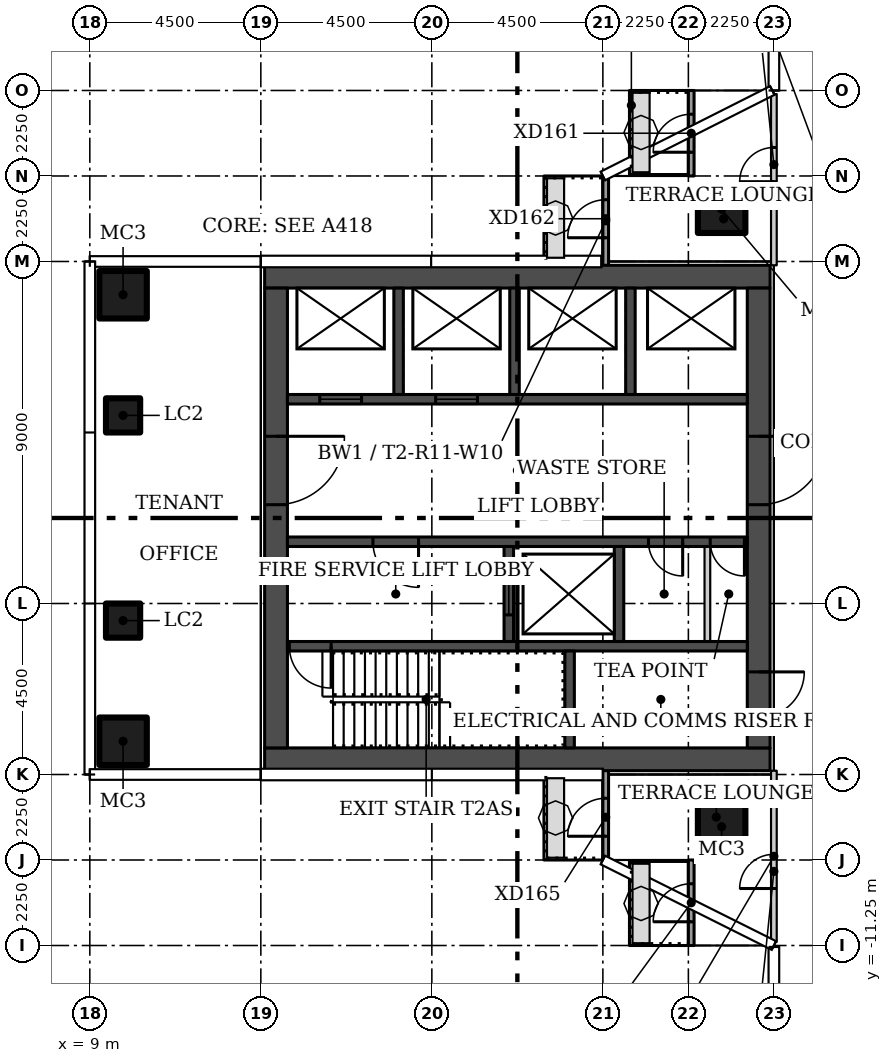
"""IFC4 building model, lengths in metres.
Left out: names, types, materials, properties, quantities, classifications, styles, units other than length and angle.
Written with IfcOpenShell. Run it as: python <this file> out.ifc"""

import sys

from ifc_helpers import new_model, si_unit, direction, frame, frame_2d, origin, origin_2d, place, context, subcontext, project, spatial, rectangle, hollow_rectangle, extrude, element, fill, save


model = new_model("IFC4")
c1 = context("Model", 3, precision=1e-05, world=origin(), true_north=direction((0.0, 1.0)))
c2 = subcontext(c1, "Body", "Model", "MODEL_VIEW")
j1 = project(units=[si_unit("LENGTHUNIT", "METRE"), si_unit("PLANEANGLEUNIT", "RADIAN")], contexts=[c1])
p1 = place(None, origin())
s1 = spatial("IfcSite", under=j1, at=p1, CompositionType="ELEMENT")
p2 = place(p1, origin())
s2 = spatial("IfcBuilding", under=s1, at=p2, CompositionType="ELEMENT")
p3 = place(p2, frame((0.0, 0.0, 109.2)))
s3 = spatial("IfcBuildingStorey", under=s2, at=p3, CompositionType="ELEMENT", Elevation=109.2)
for number, where in (
    (1, (25.625, 8.125, 0.0)),
    (2, (25.625, -8.125, 0.0)),
    (3, (9.875, -5.875, 0.0)),
    (4, (9.875, 5.875, 0.0)),
):
    element("IfcColumn", number, at=place(p3, frame(where)), inside=s3, PredefinedType="COLUMN", context=c2, shape_type="SweptSolid", body=[
        extrude(hollow_rectangle(XDim=1.25, YDim=1.25, WallThickness=0.05, at=origin_2d()), origin(), (0.0, 0.0, 1.0), 3.55),
    ])
for number, where in (
    (5, (9.875, -2.7, 0.0)),
    (6, (9.875, 2.7, 0.0)),
):
    element("IfcColumn", number, at=place(p3, frame(where)), inside=s3, PredefinedType="COLUMN", context=c2, shape_type="SweptSolid", body=[
        extrude(hollow_rectangle(XDim=0.9, YDim=0.9, WallThickness=0.036, at=origin_2d()), origin(), (0.0, 0.0, 1.0), 3.55),
    ])
p4 = place(p3, frame((27.0, 6.65, 0.0), z_axis=(0.0, 0.0, 1.0), x_axis=(0.0, 1.0, 0.0)))
e7 = element("IfcWall", 7, at=p4, inside=s3, PredefinedType="PARTITIONING", context=c2, shape_type="SweptSolid", body=[
    extrude(rectangle(XDim=4.505, YDim=0.15, at=frame_2d((2.252, 0.0))), origin(), (0.0, 0.0, 1.0), 3.55),
])
p5 = place(p4, frame((2.2, 0.0, 0.0)))
e8 = element("IfcOpeningElement", 8, at=p5, cuts=e7, PredefinedType="OPENING", context=c2, shape_type="SweptSolid", body=[
    extrude(rectangle(XDim=0.9, YDim=2.1, at=frame_2d((0.45, 1.05))), frame((0.0, 0.085, 0.0), z_axis=(0.0, -1.0, 0.0), x_axis=(1.0, 0.0, 0.0)), (0.0, 0.0, 1.0), 0.17),
])
p6 = place(p3, frame((27.0, -11.155, 0.0), z_axis=(0.0, 0.0, 1.0), x_axis=(0.0, 1.0, 0.0)))
e9 = element("IfcWall", 9, at=p6, inside=s3, PredefinedType="PARTITIONING", context=c2, shape_type="SweptSolid", body=[
    extrude(rectangle(XDim=4.505, YDim=0.15, at=frame_2d((2.252, 0.0))), origin(), (0.0, 0.0, 1.0), 3.55),
])
p7 = place(p6, frame((1.405, 0.0, 0.0)))
e10 = element("IfcOpeningElement", 10, at=p7, cuts=e9, PredefinedType="OPENING", context=c2, shape_type="SweptSolid", body=[
    extrude(rectangle(XDim=0.9, YDim=2.1, at=frame_2d((0.45, 1.05))), frame((0.0, 0.085, 0.0), z_axis=(0.0, -1.0, 0.0), x_axis=(1.0, 0.0, 0.0)), (0.0, 0.0, 1.0), 0.17),
])
p8 = place(p3, frame((24.825, 9.0, 0.0), z_axis=(0.0, 0.0, 1.0), x_axis=(0.0, 1.0, 0.0)))
e11 = element("IfcWall", 11, at=p8, inside=s3, PredefinedType="SOLIDWALL", context=c2, shape_type="SweptSolid", body=[
    extrude(rectangle(XDim=2.25, YDim=0.15, at=frame_2d((1.125, 0.0))), origin(), (0.0, 0.0, 1.0), 3.45),
])
p9 = place(p8, frame((0.625, 0.0, 0.0)))
e12 = element("IfcOpeningElement", 12, at=p9, cuts=e11, PredefinedType="OPENING", context=c2, shape_type="SweptSolid", body=[
    extrude(rectangle(XDim=1.0, YDim=2.4, at=frame_2d((0.5, 1.2))), frame((0.0, 0.085, 0.0), z_axis=(0.0, -1.0, 0.0), x_axis=(1.0, 0.0, 0.0)), (0.0, 0.0, 1.0), 0.17),
])
p10 = place(p3, frame((22.575, 6.643, 0.0), z_axis=(0.0, 0.0, 1.0), x_axis=(0.0, 1.0, 0.0)))
e13 = element("IfcWall", 13, at=p10, inside=s3, PredefinedType="SOLIDWALL", context=c2, shape_type="SweptSolid", body=[
    extrude(rectangle(XDim=2.357, YDim=0.15, at=frame_2d((1.178, 0.0))), origin(), (0.0, 0.0, 1.0), 3.45),
])
p11 = place(p10, frame((0.732, 0.0, 0.0)))
e14 = element("IfcOpeningElement", 14, at=p11, cuts=e13, PredefinedType="OPENING", context=c2, shape_type="SweptSolid", body=[
    extrude(rectangle(XDim=1.0, YDim=2.4, at=frame_2d((0.5, 1.2))), frame((0.0, 0.085, 0.0), z_axis=(0.0, -1.0, 0.0), x_axis=(1.0, 0.0, 0.0)), (0.0, 0.0, 1.0), 0.17),
])
p12 = place(p3, frame((22.575, -9.0, 0.0), z_axis=(0.0, 0.0, 1.0), x_axis=(0.0, 1.0, 0.0)))
e15 = element("IfcWall", 15, at=p12, inside=s3, PredefinedType="SOLIDWALL", context=c2, shape_type="SweptSolid", body=[
    extrude(rectangle(XDim=2.357, YDim=0.15, at=frame_2d((1.178, 0.0))), origin(), (0.0, 0.0, 1.0), 3.45),
])
p13 = place(p12, frame((0.625, 0.0, 0.0)))
e16 = element("IfcOpeningElement", 16, at=p13, cuts=e15, PredefinedType="OPENING", context=c2, shape_type="SweptSolid", body=[
    extrude(rectangle(XDim=1.0, YDim=2.4, at=frame_2d((0.5, 1.2))), frame((0.0, 0.085, 0.0), z_axis=(0.0, -1.0, 0.0), x_axis=(1.0, 0.0, 0.0)), (0.0, 0.0, 1.0), 0.17),
])
p14 = place(p3, frame((24.825, -11.25, 0.0), z_axis=(0.0, 0.0, 1.0), x_axis=(0.0, 1.0, 0.0)))
e17 = element("IfcWall", 17, at=p14, inside=s3, PredefinedType="SOLIDWALL", context=c2, shape_type="SweptSolid", body=[
    extrude(rectangle(XDim=2.25, YDim=0.15, at=frame_2d((1.125, 0.0))), origin(), (0.0, 0.0, 1.0), 3.45),
])
p15 = place(p14, frame((0.625, 0.0, 0.0)))
e18 = element("IfcOpeningElement", 18, at=p15, cuts=e17, PredefinedType="OPENING", context=c2, shape_type="SweptSolid", body=[
    extrude(rectangle(XDim=1.0, YDim=2.4, at=frame_2d((0.5, 1.2))), frame((0.0, 0.085, 0.0), z_axis=(0.0, -1.0, 0.0), x_axis=(1.0, 0.0, 0.0)), (0.0, 0.0, 1.0), 0.17),
])
for number, where in (
    (19, (13.6, -6.35, 0.0)),
    (20, (13.6, 6.35, 0.0)),
):
    element("IfcWall", number, at=place(p3, frame(where)), inside=s3, PredefinedType="SHEAR", context=c2, shape_type="SweptSolid", body=[
        extrude(rectangle(XDim=13.3, YDim=0.6, at=frame_2d((6.65, 0.0))), origin(), (0.0, 0.0, 1.0), 3.55),
    ])
p16 = place(p3, frame((13.9, 6.05, 0.0), z_axis=(0.0, 0.0, 1.0), x_axis=(0.0, -1.0, 0.0)))
e21 = element("IfcWall", 21, at=p16, inside=s3, PredefinedType="SHEAR", context=c2, shape_type="SweptSolid", body=[
    extrude(rectangle(XDim=12.1, YDim=0.6, at=frame_2d((6.05, 0.0))), origin(), (0.0, 0.0, 1.0), 3.55),
])
p17 = place(p16, frame((3.9, 0.0, 0.0)))
e22 = element("IfcOpeningElement", 22, at=p17, cuts=e21, PredefinedType="OPENING", context=c2, shape_type="SweptSolid", body=[
    extrude(rectangle(XDim=1.8, YDim=2.4, at=frame_2d((0.9, 1.2))), frame((0.0, 0.31, 0.0), z_axis=(0.0, -1.0, 0.0), x_axis=(1.0, 0.0, 0.0)), (0.0, 0.0, 1.0), 0.62),
])
p18 = place(p3, frame((26.6, 6.05, 0.0), z_axis=(0.0, 0.0, 1.0), x_axis=(0.0, -1.0, 0.0)))
e23 = element("IfcWall", 23, at=p18, inside=s3, PredefinedType="SHEAR", context=c2, shape_type="SweptSolid", body=[
    extrude(rectangle(XDim=12.1, YDim=0.6, at=frame_2d((6.05, 0.0))), origin(), (0.0, 0.0, 1.0), 3.55),
])
p19 = place(p18, frame((10.1, 0.0, 0.0)))
e24 = element("IfcOpeningElement", 24, at=p19, cuts=e23, PredefinedType="OPENING", context=c2, shape_type="SweptSolid", body=[
    extrude(rectangle(XDim=1.2, YDim=2.1, at=frame_2d((0.6, 1.05))), frame((0.0, 0.31, 0.0), z_axis=(0.0, -1.0, 0.0), x_axis=(1.0, 0.0, 0.0)), (0.0, 0.0, 1.0), 0.62),
])
p20 = place(p18, frame((3.9, 0.0, 0.0)))
e25 = element("IfcOpeningElement", 25, at=p20, cuts=e23, PredefinedType="OPENING", context=c2, shape_type="SweptSolid", body=[
    extrude(rectangle(XDim=1.8, YDim=2.4, at=frame_2d((0.9, 1.2))), frame((0.0, 0.31, 0.0), z_axis=(0.0, -1.0, 0.0), x_axis=(1.0, 0.0, 0.0)), (0.0, 0.0, 1.0), 0.62),
])
p21 = place(p3, frame((26.3, -3.375, 0.0), z_axis=(0.0, 0.0, 1.0), x_axis=(-1.0, 0.0, 0.0)))
e26 = element("IfcWall", 26, at=p21, inside=s3, PredefinedType="SHEAR", context=c2, shape_type="SweptSolid", body=[
    extrude(rectangle(XDim=12.1, YDim=0.25, at=frame_2d((6.05, 0.0))), origin(), (0.0, 0.0, 1.0), 3.55),
])
p22 = place(p21, frame((10.95, 0.0, 0.0)))
e27 = element("IfcOpeningElement", 27, at=p22, cuts=e26, PredefinedType="OPENING", context=c2, shape_type="SweptSolid", body=[
    extrude(rectangle(XDim=1.1, YDim=2.1, at=frame_2d((0.55, 1.05))), frame((0.0, 0.135, 0.0), z_axis=(0.0, -1.0, 0.0), x_axis=(1.0, 0.0, 0.0)), (0.0, 0.0, 1.0), 0.27),
])
p23 = place(p3, frame((21.625, -6.05, 0.0), z_axis=(0.0, 0.0, 1.0), x_axis=(0.0, 1.0, 0.0)))
e28 = element("IfcWall", 28, at=p23, inside=s3, PredefinedType="SHEAR", context=c2, shape_type="SweptSolid", body=[
    extrude(rectangle(XDim=2.55, YDim=0.25, at=frame_2d((1.275, 0.0))), origin(), (0.0, 0.0, 1.0), 3.55),
])
p24 = place(p3, frame((26.3, -0.625, 0.0), z_axis=(0.0, 0.0, 1.0), x_axis=(-1.0, 0.0, 0.0)))
e29 = element("IfcWall", 29, at=p24, inside=s3, PredefinedType="SHEAR", context=c2, shape_type="SweptSolid", body=[
    extrude(rectangle(XDim=12.1, YDim=0.25, at=frame_2d((6.05, 0.0))), origin(), (0.0, 0.0, 1.0), 3.55),
])
p25 = place(p24, frame((8.65, 0.0, 0.0)))
e30 = element("IfcOpeningElement", 30, at=p25, cuts=e29, PredefinedType="OPENING", context=c2, shape_type="SweptSolid", body=[
    extrude(rectangle(XDim=1.2, YDim=2.1, at=frame_2d((0.6, 1.05))), frame((0.0, 0.135, 0.0), z_axis=(0.0, -1.0, 0.0), x_axis=(1.0, 0.0, 0.0)), (0.0, 0.0, 1.0), 0.27),
])
p26 = place(p24, frame((1.7, 0.0, 0.0)))
e31 = element("IfcOpeningElement", 31, at=p26, cuts=e29, PredefinedType="OPENING", context=c2, shape_type="SweptSolid", body=[
    extrude(rectangle(XDim=0.9, YDim=2.1, at=frame_2d((0.45, 1.05))), frame((0.0, 0.135, 0.0), z_axis=(0.0, -1.0, 0.0), x_axis=(1.0, 0.0, 0.0)), (0.0, 0.0, 1.0), 0.27),
])
p27 = place(p24, frame((0.075, 0.0, 0.0)))
e32 = element("IfcOpeningElement", 32, at=p27, cuts=e29, PredefinedType="OPENING", context=c2, shape_type="SweptSolid", body=[
    extrude(rectangle(XDim=0.9, YDim=2.1, at=frame_2d((0.45, 1.05))), frame((0.0, 0.135, 0.0), z_axis=(0.0, -1.0, 0.0), x_axis=(1.0, 0.0, 0.0)), (0.0, 0.0, 1.0), 0.27),
])
p28 = place(p3, frame((20.025, -3.25, 0.0), z_axis=(0.0, 0.0, 1.0), x_axis=(0.0, 1.0, 0.0)))
e33 = element("IfcWall", 33, at=p28, inside=s3, PredefinedType="SHEAR", context=c2, shape_type="SweptSolid", body=[
    extrude(rectangle(XDim=2.5, YDim=0.25, at=frame_2d((1.25, 0.0))), origin(), (0.0, 0.0, 1.0), 3.55),
])
p29 = place(p28, frame((0.7, 0.0, 0.0)))
e34 = element("IfcOpeningElement", 34, at=p29, cuts=e33, PredefinedType="OPENING", context=c2, shape_type="SweptSolid", body=[
    extrude(rectangle(XDim=1.1, YDim=2.1, at=frame_2d((0.55, 1.05))), frame((0.0, 0.135, 0.0), z_axis=(0.0, -1.0, 0.0), x_axis=(1.0, 0.0, 0.0)), (0.0, 0.0, 1.0), 0.27),
])
p30 = place(p3, frame((22.925, -3.25, 0.0), z_axis=(0.0, 0.0, 1.0), x_axis=(0.0, 1.0, 0.0)))
e35 = element("IfcWall", 35, at=p30, inside=s3, PredefinedType="SHEAR", context=c2, shape_type="SweptSolid", body=[
    extrude(rectangle(XDim=2.5, YDim=0.25, at=frame_2d((1.25, 0.0))), origin(), (0.0, 0.0, 1.0), 3.55),
])
p31 = place(p3, frame((25.25, -3.25, 0.0), z_axis=(0.0, 0.0, 1.0), x_axis=(0.0, 1.0, 0.0)))
e36 = element("IfcWall", 36, at=p31, inside=s3, PredefinedType="PARTITIONING", context=c2, shape_type="SweptSolid", body=[
    extrude(rectangle(XDim=2.5, YDim=0.15, at=frame_2d((1.25, 0.0))), origin(), (0.0, 0.0, 1.0), 3.55),
])
p32 = place(p3, frame((14.2, 3.125, 0.0)))
e37 = element("IfcWall", 37, at=p32, inside=s3, PredefinedType="SHEAR", context=c2, shape_type="SweptSolid", body=[
    extrude(rectangle(XDim=12.1, YDim=0.25, at=frame_2d((6.05, 0.0))), origin(), (0.0, 0.0, 1.0), 3.55),
])
p33 = place(p32, frame((0.85, 0.0, 0.0)))
e38 = element("IfcOpeningElement", 38, at=p33, cuts=e37, PredefinedType="OPENING", context=c2, shape_type="SweptSolid", body=[
    extrude(rectangle(XDim=1.1, YDim=2.1, at=frame_2d((0.55, 1.05))), frame((0.0, 0.135, 0.0), z_axis=(0.0, -1.0, 0.0), x_axis=(1.0, 0.0, 0.0)), (0.0, 0.0, 1.0), 0.27),
])
p34 = place(p32, frame((3.9, 0.0, 0.0)))
e39 = element("IfcOpeningElement", 39, at=p34, cuts=e37, PredefinedType="OPENING", context=c2, shape_type="SweptSolid", body=[
    extrude(rectangle(XDim=1.1, YDim=2.1, at=frame_2d((0.55, 1.05))), frame((0.0, 0.135, 0.0), z_axis=(0.0, -1.0, 0.0), x_axis=(1.0, 0.0, 0.0)), (0.0, 0.0, 1.0), 0.27),
])
for number, where, z_axis, x_axis in (
    (40, (17.125, 3.25, 0.0), (0.0, 0.0, 1.0), (0.0, 1.0, 0.0)),
    (41, (20.175, 3.25, 0.0), (0.0, 0.0, 1.0), (0.0, 1.0, 0.0)),
    (42, (23.225, 3.25, 0.0), (0.0, 0.0, 1.0), (0.0, 1.0, 0.0)),
):
    element("IfcWall", number, at=place(p3, frame(where, z_axis=z_axis, x_axis=x_axis)), inside=s3, PredefinedType="SHEAR", context=c2, shape_type="SweptSolid", body=[
        extrude(rectangle(XDim=2.8, YDim=0.25, at=frame_2d((1.4, 0.0))), origin(), (0.0, 0.0, 1.0), 3.55),
    ])
p35 = place(p7, origin())
e43 = element("IfcDoor", 43, at=p35, inside=s3, OperationType="SINGLE_SWING_LEFT", PredefinedType="DOOR", context=c2, shape_type="SweptSolid", body=[
    extrude(rectangle(XDim=0.9, YDim=2.1, at=frame_2d((0.45, 1.05))), frame((0.0, 0.025, 0.0), z_axis=(0.0, -1.0, 0.0), x_axis=(1.0, 0.0, 0.0)), (0.0, 0.0, 1.0), 0.05),
])
fill(e10, e43)
p36 = place(p5, origin())
e44 = element("IfcDoor", 44, at=p36, inside=s3, OperationType="SINGLE_SWING_RIGHT", PredefinedType="DOOR", context=c2, shape_type="SweptSolid", body=[
    extrude(rectangle(XDim=0.9, YDim=2.1, at=frame_2d((0.45, 1.05))), frame((0.0, 0.025, 0.0), z_axis=(0.0, -1.0, 0.0), x_axis=(1.0, 0.0, 0.0)), (0.0, 0.0, 1.0), 0.05),
])
fill(e8, e44)
p37 = place(p9, origin())
e45 = element("IfcDoor", 45, at=p37, inside=s3, OperationType="SINGLE_SWING_RIGHT", PredefinedType="DOOR", context=c2, shape_type="SweptSolid", body=[
    extrude(rectangle(XDim=1.0, YDim=2.4, at=frame_2d((0.5, 1.2))), frame((0.0, 0.025, 0.0), z_axis=(0.0, -1.0, 0.0), x_axis=(1.0, 0.0, 0.0)), (0.0, 0.0, 1.0), 0.05),
])
fill(e12, e45)
p38 = place(p11, origin())
e46 = element("IfcDoor", 46, at=p38, inside=s3, OperationType="SINGLE_SWING_LEFT", PredefinedType="DOOR", context=c2, shape_type="SweptSolid", body=[
    extrude(rectangle(XDim=1.0, YDim=2.4, at=frame_2d((0.5, 1.2))), frame((0.0, 0.025, 0.0), z_axis=(0.0, -1.0, 0.0), x_axis=(1.0, 0.0, 0.0)), (0.0, 0.0, 1.0), 0.05),
])
fill(e14, e46)
p39 = place(p13, origin())
e47 = element("IfcDoor", 47, at=p39, inside=s3, OperationType="SINGLE_SWING_LEFT", PredefinedType="DOOR", context=c2, shape_type="SweptSolid", body=[
    extrude(rectangle(XDim=1.0, YDim=2.4, at=frame_2d((0.5, 1.2))), frame((0.0, 0.025, 0.0), z_axis=(0.0, -1.0, 0.0), x_axis=(1.0, 0.0, 0.0)), (0.0, 0.0, 1.0), 0.05),
])
fill(e16, e47)
p40 = place(p15, origin())
e48 = element("IfcDoor", 48, at=p40, inside=s3, OperationType="SINGLE_SWING_RIGHT", PredefinedType="DOOR", context=c2, shape_type="SweptSolid", body=[
    extrude(rectangle(XDim=1.0, YDim=2.4, at=frame_2d((0.5, 1.2))), frame((0.0, 0.025, 0.0), z_axis=(0.0, -1.0, 0.0), x_axis=(1.0, 0.0, 0.0)), (0.0, 0.0, 1.0), 0.05),
])
fill(e18, e48)
p41 = place(p17, origin())
e49 = element("IfcDoor", 49, at=p41, inside=s3, OperationType="DOUBLE_DOOR_SINGLE_SWING", PredefinedType="DOOR", context=c2, shape_type="SweptSolid", body=[
    extrude(rectangle(XDim=1.8, YDim=2.4, at=frame_2d((0.9, 1.2))), frame((0.0, 0.025, 0.0), z_axis=(0.0, -1.0, 0.0), x_axis=(1.0, 0.0, 0.0)), (0.0, 0.0, 1.0), 0.05),
])
fill(e22, e49)
p42 = place(p19, origin())
e50 = element("IfcDoor", 50, at=p42, inside=s3, OperationType="SINGLE_SWING_RIGHT", PredefinedType="DOOR", context=c2, shape_type="SweptSolid", body=[
    extrude(rectangle(XDim=1.2, YDim=2.1, at=frame_2d((0.6, 1.05))), frame((0.0, 0.025, 0.0), z_axis=(0.0, -1.0, 0.0), x_axis=(1.0, 0.0, 0.0)), (0.0, 0.0, 1.0), 0.05),
])
fill(e24, e50)
p43 = place(p20, origin())
e51 = element("IfcDoor", 51, at=p43, inside=s3, OperationType="DOUBLE_DOOR_SINGLE_SWING", PredefinedType="DOOR", context=c2, shape_type="SweptSolid", body=[
    extrude(rectangle(XDim=1.8, YDim=2.4, at=frame_2d((0.9, 1.2))), frame((0.0, 0.025, 0.0), z_axis=(0.0, -1.0, 0.0), x_axis=(1.0, 0.0, 0.0)), (0.0, 0.0, 1.0), 0.05),
])
fill(e25, e51)
p44 = place(p22, origin())
e52 = element("IfcDoor", 52, at=p44, inside=s3, OperationType="SINGLE_SWING_RIGHT", PredefinedType="DOOR", context=c2, shape_type="SweptSolid", body=[
    extrude(rectangle(XDim=1.1, YDim=2.1, at=frame_2d((0.55, 1.05))), frame((0.0, 0.025, 0.0), z_axis=(0.0, -1.0, 0.0), x_axis=(1.0, 0.0, 0.0)), (0.0, 0.0, 1.0), 0.05),
])
fill(e27, e52)
p45 = place(p25, origin())
e53 = element("IfcDoor", 53, at=p45, inside=s3, OperationType="SINGLE_SWING_RIGHT", PredefinedType="DOOR", context=c2, shape_type="SweptSolid", body=[
    extrude(rectangle(XDim=1.2, YDim=2.1, at=frame_2d((0.6, 1.05))), frame((0.0, 0.025, 0.0), z_axis=(0.0, -1.0, 0.0), x_axis=(1.0, 0.0, 0.0)), (0.0, 0.0, 1.0), 0.05),
])
fill(e30, e53)
p46 = place(p26, origin())
e54 = element("IfcDoor", 54, at=p46, inside=s3, OperationType="SINGLE_SWING_LEFT", PredefinedType="DOOR", context=c2, shape_type="SweptSolid", body=[
    extrude(rectangle(XDim=0.9, YDim=2.1, at=frame_2d((0.45, 1.05))), frame((0.0, 0.025, 0.0), z_axis=(0.0, -1.0, 0.0), x_axis=(1.0, 0.0, 0.0)), (0.0, 0.0, 1.0), 0.05),
])
fill(e31, e54)
p47 = place(p27, origin())
e55 = element("IfcDoor", 55, at=p47, inside=s3, OperationType="SINGLE_SWING_LEFT", PredefinedType="DOOR", context=c2, shape_type="SweptSolid", body=[
    extrude(rectangle(XDim=0.9, YDim=2.1, at=frame_2d((0.45, 1.05))), frame((0.0, 0.025, 0.0), z_axis=(0.0, -1.0, 0.0), x_axis=(1.0, 0.0, 0.0)), (0.0, 0.0, 1.0), 0.05),
])
fill(e32, e55)
p48 = place(p29, origin())
e56 = element("IfcDoor", 56, at=p48, inside=s3, OperationType="SLIDING_TO_LEFT", PredefinedType="DOOR", context=c2, shape_type="SweptSolid", body=[
    extrude(rectangle(XDim=1.1, YDim=2.1, at=frame_2d((0.55, 1.05))), frame((0.0, 0.025, 0.0), z_axis=(0.0, -1.0, 0.0), x_axis=(1.0, 0.0, 0.0)), (0.0, 0.0, 1.0), 0.05),
])
fill(e34, e56)
p49 = place(p33, origin())
e57 = element("IfcDoor", 57, at=p49, inside=s3, OperationType="SLIDING_TO_LEFT", PredefinedType="DOOR", context=c2, shape_type="SweptSolid", body=[
    extrude(rectangle(XDim=1.1, YDim=2.1, at=frame_2d((0.55, 1.05))), frame((0.0, 0.025, 0.0), z_axis=(0.0, -1.0, 0.0), x_axis=(1.0, 0.0, 0.0)), (0.0, 0.0, 1.0), 0.05),
])
fill(e38, e57)
p50 = place(p34, origin())
e58 = element("IfcDoor", 58, at=p50, inside=s3, OperationType="SLIDING_TO_LEFT", PredefinedType="DOOR", context=c2, shape_type="SweptSolid", body=[
    extrude(rectangle(XDim=1.1, YDim=2.1, at=frame_2d((0.55, 1.05))), frame((0.0, 0.025, 0.0), z_axis=(0.0, -1.0, 0.0), x_axis=(1.0, 0.0, 0.0)), (0.0, 0.0, 1.0), 0.05),
])
fill(e39, e58)
save(model, sys.argv[1])
